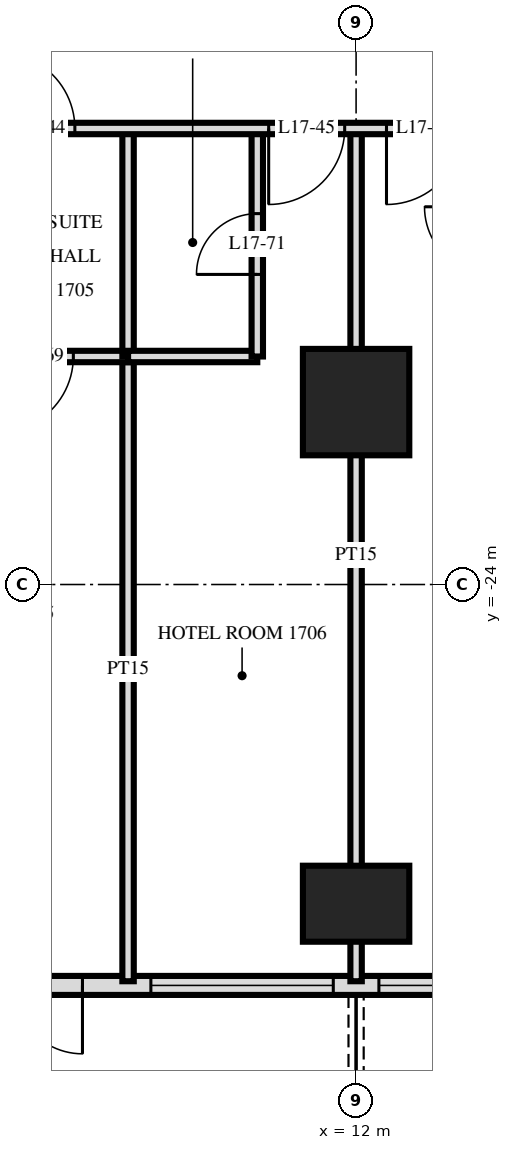
"""IFC4 building model, lengths in metres.
Left out: names, types, materials, properties, quantities, classifications, styles, units other than length and angle.
Written with IfcOpenShell. Run it as: python <this file> out.ifc"""

import sys

from ifc_helpers import new_model, si_unit, direction, frame, frame_2d, origin, origin_2d, place, context, subcontext, project, spatial, rectangle, extrude, element, fill, save


model = new_model("IFC4")
c1 = context("Model", 3, precision=1e-05, world=origin(), true_north=direction((0.0, 1.0)))
c2 = subcontext(c1, "Body", "Model", "MODEL_VIEW")
j1 = project(units=[si_unit("LENGTHUNIT", "METRE"), si_unit("PLANEANGLEUNIT", "RADIAN")], contexts=[c1])
p1 = place(None, origin())
s1 = spatial("IfcSite", under=j1, at=p1, CompositionType="ELEMENT")
p2 = place(p1, origin())
s2 = spatial("IfcBuilding", under=s1, at=p2, CompositionType="ELEMENT")
p3 = place(p2, frame((0.0, 0.0, 70.8)))
s3 = spatial("IfcBuildingStorey", under=s2, at=p3, CompositionType="ELEMENT", Elevation=70.8)
p4 = place(p3, frame((12.0, -28.2, 0.0), z_axis=(0.0, 0.0, 1.0), x_axis=(1.0, 0.0, 0.0)))
e1 = element("IfcColumn", 1, at=p4, inside=s3, PredefinedType="COLUMN", context=c2, shape_type="SweptSolid", body=[
    extrude(rectangle(XDim=1.4, YDim=1.0, at=origin_2d()), origin(), (0.0, 0.0, 1.0), 3.6),
])
p5 = place(p3, frame((12.0, -21.6, 0.0), z_axis=(0.0, 0.0, 1.0), x_axis=(1.0, 0.0, 0.0)))
e2 = element("IfcColumn", 2, at=p5, inside=s3, PredefinedType="COLUMN", context=c2, shape_type="SweptSolid", body=[
    extrude(rectangle(XDim=1.4, YDim=1.4, at=origin_2d()), origin(), (0.0, 0.0, 1.0), 3.6),
])
p6 = place(p3, frame((-28.775, -29.275, 0.0), z_axis=(0.0, 0.0, 1.0), x_axis=(1.0, 0.0, 0.0)))
e3 = element("IfcWall", 3, at=p6, inside=s3, PredefinedType="SOLIDWALL", context=c2, shape_type="SweptSolid", body=[
    extrude(rectangle(XDim=57.551, YDim=0.25, at=frame_2d((28.775, 0.0))), origin(), (0.0, 0.0, 1.0), 3.32),
])
p7 = place(p6, frame((0.575, 0.0, 0.0)))
e4 = element("IfcOpeningElement", 4, at=p7, cuts=e3, PredefinedType="OPENING", context=c2, shape_type="SweptSolid", body=[
    extrude(rectangle(XDim=1.8, YDim=2.4, at=frame_2d((0.9, 1.2))), frame((0.0, 0.135, 0.0), z_axis=(0.0, -1.0, 0.0), x_axis=(1.0, 0.0, 0.0)), (0.0, 0.0, 1.0), 0.27),
])
p8 = place(p6, frame((5.075, 0.0, 0.3)))
e5 = element("IfcOpeningElement", 5, at=p8, cuts=e3, PredefinedType="OPENING", context=c2, shape_type="SweptSolid", body=[
    extrude(rectangle(XDim=2.4, YDim=2.1, at=frame_2d((1.2, 1.05))), frame((0.0, 0.135, 0.0), z_axis=(0.0, -1.0, 0.0), x_axis=(1.0, 0.0, 0.0)), (0.0, 0.0, 1.0), 0.27),
])
p9 = place(p6, frame((8.375, 0.0, 0.0)))
e6 = element("IfcOpeningElement", 6, at=p9, cuts=e3, PredefinedType="OPENING", context=c2, shape_type="SweptSolid", body=[
    extrude(rectangle(XDim=1.8, YDim=2.4, at=frame_2d((0.9, 1.2))), frame((0.0, 0.135, 0.0), z_axis=(0.0, -1.0, 0.0), x_axis=(1.0, 0.0, 0.0)), (0.0, 0.0, 1.0), 0.27),
])
p10 = place(p6, frame((11.375, 0.0, 0.0)))
e7 = element("IfcOpeningElement", 7, at=p10, cuts=e3, PredefinedType="OPENING", context=c2, shape_type="SweptSolid", body=[
    extrude(rectangle(XDim=1.8, YDim=2.4, at=frame_2d((0.9, 1.2))), frame((0.0, 0.135, 0.0), z_axis=(0.0, -1.0, 0.0), x_axis=(1.0, 0.0, 0.0)), (0.0, 0.0, 1.0), 0.27),
])
p11 = place(p6, frame((14.075, 0.0, 0.3)))
e8 = element("IfcOpeningElement", 8, at=p11, cuts=e3, PredefinedType="OPENING", context=c2, shape_type="SweptSolid", body=[
    extrude(rectangle(XDim=2.4, YDim=2.1, at=frame_2d((1.2, 1.05))), frame((0.0, 0.135, 0.0), z_axis=(0.0, -1.0, 0.0), x_axis=(1.0, 0.0, 0.0)), (0.0, 0.0, 1.0), 0.27),
])
p12 = place(p6, frame((17.375, 0.0, 0.0)))
e9 = element("IfcOpeningElement", 9, at=p12, cuts=e3, PredefinedType="OPENING", context=c2, shape_type="SweptSolid", body=[
    extrude(rectangle(XDim=1.8, YDim=2.4, at=frame_2d((0.9, 1.2))), frame((0.0, 0.135, 0.0), z_axis=(0.0, -1.0, 0.0), x_axis=(1.0, 0.0, 0.0)), (0.0, 0.0, 1.0), 0.27),
])
p13 = place(p6, frame((20.075, 0.0, 0.3)))
e10 = element("IfcOpeningElement", 10, at=p13, cuts=e3, PredefinedType="OPENING", context=c2, shape_type="SweptSolid", body=[
    extrude(rectangle(XDim=2.4, YDim=2.1, at=frame_2d((1.2, 1.05))), frame((0.0, 0.135, 0.0), z_axis=(0.0, -1.0, 0.0), x_axis=(1.0, 0.0, 0.0)), (0.0, 0.0, 1.0), 0.27),
])
p14 = place(p6, frame((23.075, 0.0, 0.3)))
e11 = element("IfcOpeningElement", 11, at=p14, cuts=e3, PredefinedType="OPENING", context=c2, shape_type="SweptSolid", body=[
    extrude(rectangle(XDim=2.4, YDim=2.1, at=frame_2d((1.2, 1.05))), frame((0.0, 0.135, 0.0), z_axis=(0.0, -1.0, 0.0), x_axis=(1.0, 0.0, 0.0)), (0.0, 0.0, 1.0), 0.27),
])
p15 = place(p6, frame((26.375, 0.0, 0.0)))
e12 = element("IfcOpeningElement", 12, at=p15, cuts=e3, PredefinedType="OPENING", context=c2, shape_type="SweptSolid", body=[
    extrude(rectangle(XDim=1.8, YDim=2.4, at=frame_2d((0.9, 1.2))), frame((0.0, 0.135, 0.0), z_axis=(0.0, -1.0, 0.0), x_axis=(1.0, 0.0, 0.0)), (0.0, 0.0, 1.0), 0.27),
])
p16 = place(p6, frame((29.375, 0.0, 0.0)))
e13 = element("IfcOpeningElement", 13, at=p16, cuts=e3, PredefinedType="OPENING", context=c2, shape_type="SweptSolid", body=[
    extrude(rectangle(XDim=1.8, YDim=2.4, at=frame_2d((0.9, 1.2))), frame((0.0, 0.135, 0.0), z_axis=(0.0, -1.0, 0.0), x_axis=(1.0, 0.0, 0.0)), (0.0, 0.0, 1.0), 0.27),
])
p17 = place(p6, frame((32.075, 0.0, 0.3)))
e14 = element("IfcOpeningElement", 14, at=p17, cuts=e3, PredefinedType="OPENING", context=c2, shape_type="SweptSolid", body=[
    extrude(rectangle(XDim=2.4, YDim=2.1, at=frame_2d((1.2, 1.05))), frame((0.0, 0.135, 0.0), z_axis=(0.0, -1.0, 0.0), x_axis=(1.0, 0.0, 0.0)), (0.0, 0.0, 1.0), 0.27),
])
p18 = place(p6, frame((35.375, 0.0, 0.0)))
e15 = element("IfcOpeningElement", 15, at=p18, cuts=e3, PredefinedType="OPENING", context=c2, shape_type="SweptSolid", body=[
    extrude(rectangle(XDim=1.8, YDim=2.4, at=frame_2d((0.9, 1.2))), frame((0.0, 0.135, 0.0), z_axis=(0.0, -1.0, 0.0), x_axis=(1.0, 0.0, 0.0)), (0.0, 0.0, 1.0), 0.27),
])
p19 = place(p6, frame((38.075, 0.0, 0.3)))
e16 = element("IfcOpeningElement", 16, at=p19, cuts=e3, PredefinedType="OPENING", context=c2, shape_type="SweptSolid", body=[
    extrude(rectangle(XDim=2.4, YDim=2.1, at=frame_2d((1.2, 1.05))), frame((0.0, 0.135, 0.0), z_axis=(0.0, -1.0, 0.0), x_axis=(1.0, 0.0, 0.0)), (0.0, 0.0, 1.0), 0.27),
])
p20 = place(p6, frame((41.075, 0.0, 0.3)))
e17 = element("IfcOpeningElement", 17, at=p20, cuts=e3, PredefinedType="OPENING", context=c2, shape_type="SweptSolid", body=[
    extrude(rectangle(XDim=2.4, YDim=2.1, at=frame_2d((1.2, 1.05))), frame((0.0, 0.135, 0.0), z_axis=(0.0, -1.0, 0.0), x_axis=(1.0, 0.0, 0.0)), (0.0, 0.0, 1.0), 0.27),
])
p21 = place(p6, frame((44.375, 0.0, 0.0)))
e18 = element("IfcOpeningElement", 18, at=p21, cuts=e3, PredefinedType="OPENING", context=c2, shape_type="SweptSolid", body=[
    extrude(rectangle(XDim=1.8, YDim=2.4, at=frame_2d((0.9, 1.2))), frame((0.0, 0.135, 0.0), z_axis=(0.0, -1.0, 0.0), x_axis=(1.0, 0.0, 0.0)), (0.0, 0.0, 1.0), 0.27),
])
p22 = place(p6, frame((47.075, 0.0, 0.3)))
e19 = element("IfcOpeningElement", 19, at=p22, cuts=e3, PredefinedType="OPENING", context=c2, shape_type="SweptSolid", body=[
    extrude(rectangle(XDim=2.4, YDim=2.1, at=frame_2d((1.2, 1.05))), frame((0.0, 0.135, 0.0), z_axis=(0.0, -1.0, 0.0), x_axis=(1.0, 0.0, 0.0)), (0.0, 0.0, 1.0), 0.27),
])
p23 = place(p6, frame((50.375, 0.0, 0.0)))
e20 = element("IfcOpeningElement", 20, at=p23, cuts=e3, PredefinedType="OPENING", context=c2, shape_type="SweptSolid", body=[
    extrude(rectangle(XDim=1.8, YDim=2.4, at=frame_2d((0.9, 1.2))), frame((0.0, 0.135, 0.0), z_axis=(0.0, -1.0, 0.0), x_axis=(1.0, 0.0, 0.0)), (0.0, 0.0, 1.0), 0.27),
])
p24 = place(p6, frame((53.375, 0.0, 0.0)))
e21 = element("IfcOpeningElement", 21, at=p24, cuts=e3, PredefinedType="OPENING", context=c2, shape_type="SweptSolid", body=[
    extrude(rectangle(XDim=1.8, YDim=2.4, at=frame_2d((0.9, 1.2))), frame((0.0, 0.135, 0.0), z_axis=(0.0, -1.0, 0.0), x_axis=(1.0, 0.0, 0.0)), (0.0, 0.0, 1.0), 0.27),
])
p25 = place(p3, frame((12.0, -29.22, 0.0), z_axis=(0.0, 0.0, 1.0), x_axis=(0.0, 1.0, 0.0)))
e22 = element("IfcWall", 22, at=p25, inside=s3, PredefinedType="PARTITIONING", context=c2, shape_type="SweptSolid", body=[
    extrude(rectangle(XDim=11.22, YDim=0.15, at=frame_2d((5.61, 0.0))), origin(), (0.0, 0.0, 1.0), 3.32),
])
p26 = place(p3, frame((10.7, -21.0, 0.0), z_axis=(0.0, 0.0, 1.0), x_axis=(0.0, 1.0, 0.0)))
e23 = element("IfcWall", 23, at=p26, inside=s3, PredefinedType="PARTITIONING", context=c2, shape_type="SweptSolid", body=[
    extrude(rectangle(XDim=3.0, YDim=0.15, at=frame_2d((1.5, 0.0))), origin(), (0.0, 0.0, 1.0), 3.32),
])
p27 = place(p26, frame((1.08, 0.0, 0.0)))
e24 = element("IfcOpeningElement", 24, at=p27, cuts=e23, PredefinedType="OPENING", context=c2, shape_type="SweptSolid", body=[
    extrude(rectangle(XDim=0.8, YDim=2.1, at=frame_2d((0.4, 1.05))), frame((0.0, 0.085, 0.0), z_axis=(0.0, -1.0, 0.0), x_axis=(1.0, 0.0, 0.0)), (0.0, 0.0, 1.0), 0.17),
])
p28 = place(p3, frame((9.0, -21.0, 0.0), z_axis=(0.0, 0.0, 1.0), x_axis=(0.0, 1.0, 0.0)))
e25 = element("IfcWall", 25, at=p28, inside=s3, PredefinedType="PARTITIONING", context=c2, shape_type="SweptSolid", body=[
    extrude(rectangle(XDim=3.0, YDim=0.15, at=frame_2d((1.5, 0.0))), origin(), (0.0, 0.0, 1.0), 3.32),
])
p29 = place(p3, frame((9.0, -29.22, 0.0), z_axis=(0.0, 0.0, 1.0), x_axis=(0.0, 1.0, 0.0)))
e26 = element("IfcWall", 26, at=p29, inside=s3, PredefinedType="PARTITIONING", context=c2, shape_type="SweptSolid", body=[
    extrude(rectangle(XDim=8.22, YDim=0.15, at=frame_2d((4.11, 0.0))), origin(), (0.0, 0.0, 1.0), 3.32),
])
p30 = place(p3, frame((6.6, -21.0, 0.0), z_axis=(0.0, 0.0, 1.0), x_axis=(1.0, 0.0, 0.0)))
e27 = element("IfcWall", 27, at=p30, inside=s3, PredefinedType="PARTITIONING", context=c2, shape_type="SweptSolid", body=[
    extrude(rectangle(XDim=2.4, YDim=0.15, at=frame_2d((1.2, 0.0))), origin(), (0.0, 0.0, 1.0), 3.32),
])
p31 = place(p30, frame((0.68, 0.0, 0.0)))
e28 = element("IfcOpeningElement", 28, at=p31, cuts=e27, PredefinedType="OPENING", context=c2, shape_type="SweptSolid", body=[
    extrude(rectangle(XDim=1.0, YDim=2.1, at=frame_2d((0.5, 1.05))), frame((0.0, 0.085, 0.0), z_axis=(0.0, -1.0, 0.0), x_axis=(1.0, 0.0, 0.0)), (0.0, 0.0, 1.0), 0.17),
])
p32 = place(p3, frame((9.0, -21.0, 0.0), z_axis=(0.0, 0.0, 1.0), x_axis=(1.0, 0.0, 0.0)))
e29 = element("IfcWall", 29, at=p32, inside=s3, PredefinedType="PARTITIONING", context=c2, shape_type="SweptSolid", body=[
    extrude(rectangle(XDim=1.7, YDim=0.15, at=frame_2d((0.85, 0.0))), origin(), (0.0, 0.0, 1.0), 3.32),
])
p33 = place(p3, frame((-33.12, -18.0, 0.0), z_axis=(0.0, 0.0, 1.0), x_axis=(1.0, 0.0, 0.0)))
e30 = element("IfcWall", 30, at=p33, inside=s3, PredefinedType="PARTITIONING", context=c2, shape_type="SweptSolid", body=[
    extrude(rectangle(XDim=66.24, YDim=0.15, at=frame_2d((33.12, 0.0))), origin(), (0.0, 0.0, 1.0), 3.32),
])
p34 = place(p33, frame((15.27, 0.0, 0.0)))
e31 = element("IfcOpeningElement", 31, at=p34, cuts=e30, PredefinedType="OPENING", context=c2, shape_type="SweptSolid", body=[
    extrude(rectangle(XDim=1.0, YDim=2.1, at=frame_2d((0.5, 1.05))), frame((0.0, 0.085, 0.0), z_axis=(0.0, -1.0, 0.0), x_axis=(1.0, 0.0, 0.0)), (0.0, 0.0, 1.0), 0.17),
])
p35 = place(p33, frame((21.22, 0.0, 0.0)))
e32 = element("IfcOpeningElement", 32, at=p35, cuts=e30, PredefinedType="OPENING", context=c2, shape_type="SweptSolid", body=[
    extrude(rectangle(XDim=1.0, YDim=2.1, at=frame_2d((0.5, 1.05))), frame((0.0, 0.085, 0.0), z_axis=(0.0, -1.0, 0.0), x_axis=(1.0, 0.0, 0.0)), (0.0, 0.0, 1.0), 0.17),
])
p36 = place(p33, frame((24.27, 0.0, 0.0)))
e33 = element("IfcOpeningElement", 33, at=p36, cuts=e30, PredefinedType="OPENING", context=c2, shape_type="SweptSolid", body=[
    extrude(rectangle(XDim=1.0, YDim=2.1, at=frame_2d((0.5, 1.05))), frame((0.0, 0.085, 0.0), z_axis=(0.0, -1.0, 0.0), x_axis=(1.0, 0.0, 0.0)), (0.0, 0.0, 1.0), 0.17),
])
p37 = place(p33, frame((30.97, 0.0, 0.0)))
e34 = element("IfcOpeningElement", 34, at=p37, cuts=e30, PredefinedType="OPENING", context=c2, shape_type="SweptSolid", body=[
    extrude(rectangle(XDim=1.0, YDim=2.1, at=frame_2d((0.5, 1.05))), frame((0.0, 0.085, 0.0), z_axis=(0.0, -1.0, 0.0), x_axis=(1.0, 0.0, 0.0)), (0.0, 0.0, 1.0), 0.17),
])
p38 = place(p33, frame((40.42, 0.0, 0.0)))
e35 = element("IfcOpeningElement", 35, at=p38, cuts=e30, PredefinedType="OPENING", context=c2, shape_type="SweptSolid", body=[
    extrude(rectangle(XDim=1.0, YDim=2.1, at=frame_2d((0.5, 1.05))), frame((0.0, 0.085, 0.0), z_axis=(0.0, -1.0, 0.0), x_axis=(1.0, 0.0, 0.0)), (0.0, 0.0, 1.0), 0.17),
])
p39 = place(p33, frame((43.97, 0.0, 0.0)))
e36 = element("IfcOpeningElement", 36, at=p39, cuts=e30, PredefinedType="OPENING", context=c2, shape_type="SweptSolid", body=[
    extrude(rectangle(XDim=1.0, YDim=2.1, at=frame_2d((0.5, 1.05))), frame((0.0, 0.085, 0.0), z_axis=(0.0, -1.0, 0.0), x_axis=(1.0, 0.0, 0.0)), (0.0, 0.0, 1.0), 0.17),
])
p40 = place(p33, frame((45.52, 0.0, 0.0)))
e37 = element("IfcOpeningElement", 37, at=p40, cuts=e30, PredefinedType="OPENING", context=c2, shape_type="SweptSolid", body=[
    extrude(rectangle(XDim=1.0, YDim=2.1, at=frame_2d((0.5, 1.05))), frame((0.0, 0.085, 0.0), z_axis=(0.0, -1.0, 0.0), x_axis=(1.0, 0.0, 0.0)), (0.0, 0.0, 1.0), 0.17),
])
p41 = place(p33, frame((52.97, 0.0, 0.0)))
e38 = element("IfcOpeningElement", 38, at=p41, cuts=e30, PredefinedType="OPENING", context=c2, shape_type="SweptSolid", body=[
    extrude(rectangle(XDim=1.0, YDim=2.1, at=frame_2d((0.5, 1.05))), frame((0.0, 0.085, 0.0), z_axis=(0.0, -1.0, 0.0), x_axis=(1.0, 0.0, 0.0)), (0.0, 0.0, 1.0), 0.17),
])
p42 = place(p33, frame((54.27, 0.0, 0.0)))
e39 = element("IfcOpeningElement", 39, at=p42, cuts=e30, PredefinedType="OPENING", context=c2, shape_type="SweptSolid", body=[
    extrude(rectangle(XDim=1.0, YDim=2.1, at=frame_2d((0.5, 1.05))), frame((0.0, 0.085, 0.0), z_axis=(0.0, -1.0, 0.0), x_axis=(1.0, 0.0, 0.0)), (0.0, 0.0, 1.0), 0.17),
])
p43 = place(p33, frame((13.42, 0.0, 0.0)))
e40 = element("IfcOpeningElement", 40, at=p43, cuts=e30, PredefinedType="OPENING", context=c2, shape_type="SweptSolid", body=[
    extrude(rectangle(XDim=1.0, YDim=2.1, at=frame_2d((0.5, 1.05))), frame((0.0, 0.085, 0.0), z_axis=(0.0, -1.0, 0.0), x_axis=(1.0, 0.0, 0.0)), (0.0, 0.0, 1.0), 0.17),
])
p44 = place(p33, frame((60.82, 0.0, 0.0)))
e41 = element("IfcOpeningElement", 41, at=p44, cuts=e30, PredefinedType="OPENING", context=c2, shape_type="SweptSolid", body=[
    extrude(rectangle(XDim=1.0, YDim=2.1, at=frame_2d((0.5, 1.05))), frame((0.0, 0.085, 0.0), z_axis=(0.0, -1.0, 0.0), x_axis=(1.0, 0.0, 0.0)), (0.0, 0.0, 1.0), 0.17),
])
p45 = place(p18, frame((0.9, 0.0, 0.0), z_axis=(0.0, 0.0, 1.0), x_axis=(-1.0, 0.0, 0.0)))
e42 = element("IfcDoor", 42, at=p45, inside=s3, OperationType="DOUBLE_DOOR_SINGLE_SWING", PredefinedType="DOOR", context=c2, shape_type="SweptSolid", body=[
    extrude(rectangle(XDim=1.8, YDim=2.4, at=frame_2d((0.0, 1.2))), frame((0.0, -0.025, 0.0), z_axis=(0.0, 1.0, 0.0), x_axis=(-1.0, 0.0, 0.0)), (0.0, 0.0, 1.0), 0.05),
])
fill(e15, e42)
p46 = place(p19, origin())
e43 = element("IfcWindow", 43, at=p46, inside=s3, PartitioningType="SINGLE_PANEL", PredefinedType="WINDOW", context=c2, shape_type="SweptSolid", body=[
    extrude(rectangle(XDim=2.4, YDim=2.1, at=frame_2d((1.2, 1.05))), frame((0.0, 0.03, 0.0), z_axis=(0.0, -1.0, 0.0), x_axis=(1.0, 0.0, 0.0)), (0.0, 0.0, 1.0), 0.06),
])
fill(e16, e43)
p47 = place(p20, origin())
e44 = element("IfcWindow", 44, at=p47, inside=s3, PartitioningType="SINGLE_PANEL", PredefinedType="WINDOW", context=c2, shape_type="SweptSolid", body=[
    extrude(rectangle(XDim=2.4, YDim=2.1, at=frame_2d((1.2, 1.05))), frame((0.0, 0.03, 0.0), z_axis=(0.0, -1.0, 0.0), x_axis=(1.0, 0.0, 0.0)), (0.0, 0.0, 1.0), 0.06),
])
fill(e17, e44)
p48 = place(p38, origin())
e45 = element("IfcDoor", 45, at=p48, inside=s3, OperationType="SINGLE_SWING_RIGHT", PredefinedType="DOOR", context=c2, shape_type="SweptSolid", body=[
    extrude(rectangle(XDim=1.0, YDim=2.1, at=frame_2d((0.5, 1.05))), frame((0.0, 0.025, 0.0), z_axis=(0.0, -1.0, 0.0), x_axis=(1.0, 0.0, 0.0)), (0.0, 0.0, 1.0), 0.05),
])
fill(e35, e45)
p49 = place(p39, frame((0.5, 0.0, 0.0), z_axis=(0.0, 0.0, 1.0), x_axis=(-1.0, 0.0, 0.0)))
e46 = element("IfcDoor", 46, at=p49, inside=s3, OperationType="SINGLE_SWING_LEFT", PredefinedType="DOOR", context=c2, shape_type="SweptSolid", body=[
    extrude(rectangle(XDim=1.0, YDim=2.1, at=frame_2d((0.0, 1.05))), frame((0.0, -0.025, 0.0), z_axis=(0.0, 1.0, 0.0), x_axis=(-1.0, 0.0, 0.0)), (0.0, 0.0, 1.0), 0.05),
])
fill(e36, e46)
p50 = place(p40, frame((0.5, 0.0, 0.0), z_axis=(0.0, 0.0, 1.0), x_axis=(-1.0, 0.0, 0.0)))
e47 = element("IfcDoor", 47, at=p50, inside=s3, OperationType="SINGLE_SWING_LEFT", PredefinedType="DOOR", context=c2, shape_type="SweptSolid", body=[
    extrude(rectangle(XDim=1.0, YDim=2.1, at=frame_2d((0.0, 1.05))), frame((0.0, -0.025, 0.0), z_axis=(0.0, 1.0, 0.0), x_axis=(-1.0, 0.0, 0.0)), (0.0, 0.0, 1.0), 0.05),
])
fill(e37, e47)
p51 = place(p31, frame((0.5, 0.0, 0.0), z_axis=(0.0, 0.0, 1.0), x_axis=(-1.0, 0.0, 0.0)))
e48 = element("IfcDoor", 48, at=p51, inside=s3, OperationType="SINGLE_SWING_LEFT", PredefinedType="DOOR", context=c2, shape_type="SweptSolid", body=[
    extrude(rectangle(XDim=1.0, YDim=2.1, at=frame_2d((0.0, 1.05))), frame((0.0, -0.025, 0.0), z_axis=(0.0, 1.0, 0.0), x_axis=(-1.0, 0.0, 0.0)), (0.0, 0.0, 1.0), 0.05),
])
fill(e28, e48)
p52 = place(p27, origin())
e49 = element("IfcDoor", 49, at=p52, inside=s3, OperationType="SINGLE_SWING_RIGHT", PredefinedType="DOOR", context=c2, shape_type="SweptSolid", body=[
    extrude(rectangle(XDim=0.8, YDim=2.1, at=frame_2d((0.4, 1.05))), frame((0.0, 0.025, 0.0), z_axis=(0.0, -1.0, 0.0), x_axis=(1.0, 0.0, 0.0)), (0.0, 0.0, 1.0), 0.05),
])
fill(e24, e49)
save(model, sys.argv[1])
